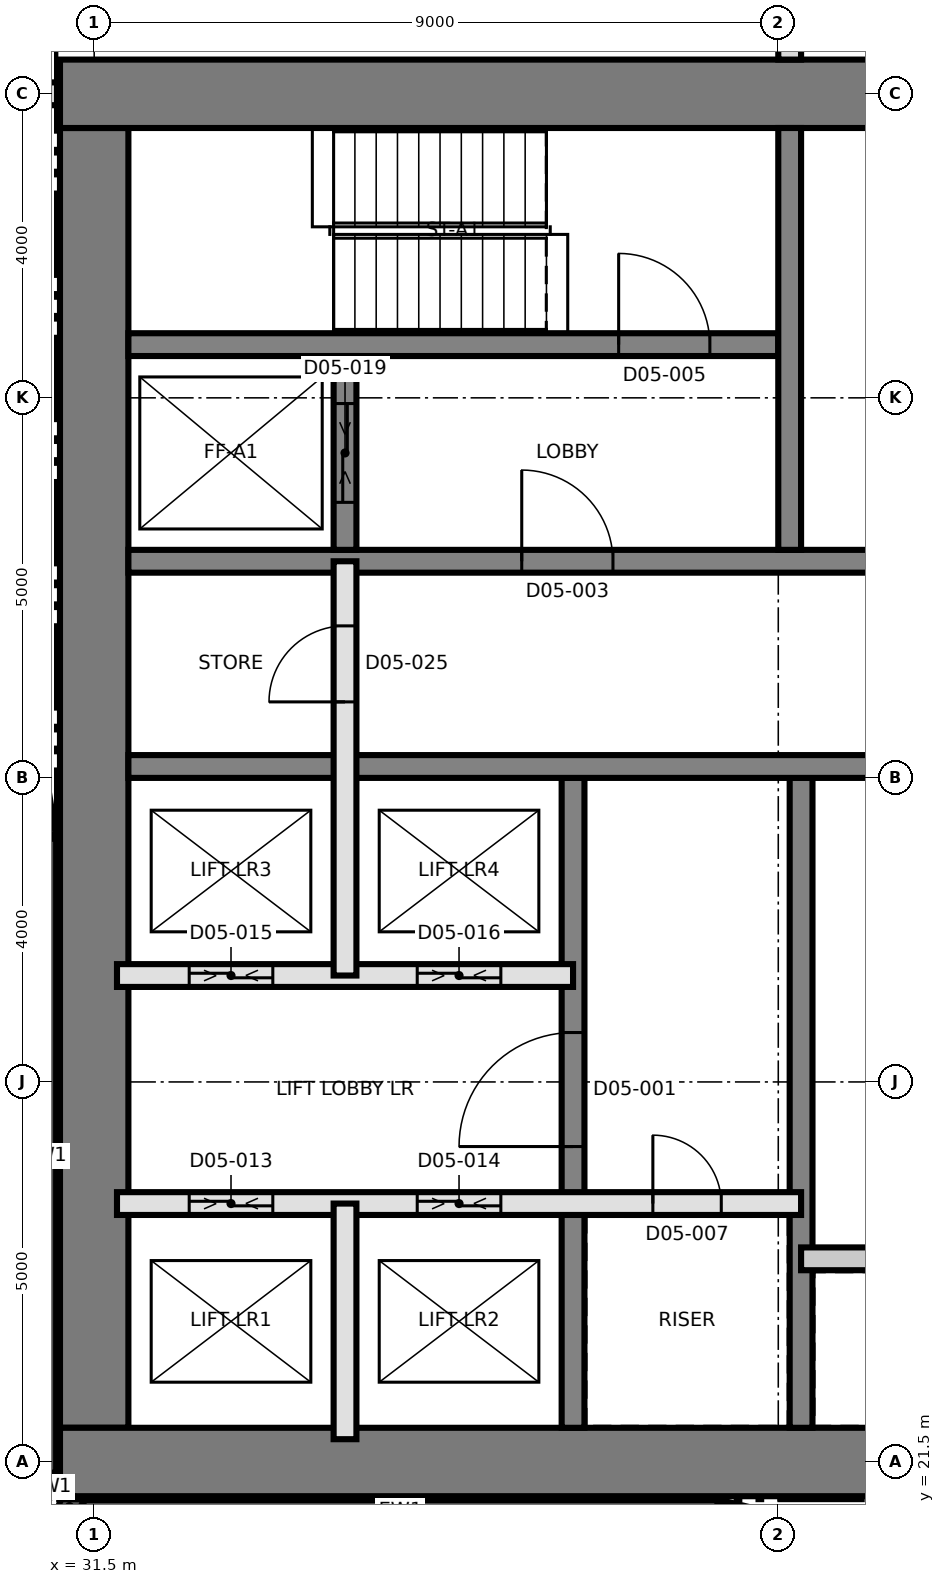
"""IFC4 building model, lengths in metres.
Left out: names, types, materials, properties, quantities, classifications, styles, units other than length and angle.
Written with IfcOpenShell. Run it as: python <this file> out.ifc"""

import sys

from ifc_helpers import new_model, si_unit, direction, frame, frame_2d, origin, place, context, subcontext, project, spatial, rectangle, extrude, element, fill, save


model = new_model("IFC4")
c1 = context("Model", 3, precision=1e-05, world=origin(), true_north=direction((0.0, 1.0)))
c2 = subcontext(c1, "Body", "Model", "MODEL_VIEW")
j1 = project(units=[si_unit("LENGTHUNIT", "METRE"), si_unit("PLANEANGLEUNIT", "RADIAN")], contexts=[c1])
p1 = place(None, origin())
s1 = spatial("IfcSite", under=j1, at=p1, CompositionType="ELEMENT")
p2 = place(p1, origin())
s2 = spatial("IfcBuilding", under=s1, at=p2, CompositionType="ELEMENT")
p3 = place(p2, frame((0.0, 0.0, 77.9)))
s3 = spatial("IfcBuildingStorey", under=s2, at=p3, CompositionType="ELEMENT", Elevation=77.9)
p4 = place(p3, frame((31.5, 21.95, 0.0), z_axis=(0.0, 0.0, 1.0), x_axis=(0.0, 1.0, 0.0)))
e1 = element("IfcWall", 1, at=p4, inside=s3, PredefinedType="SHEAR", context=c2, shape_type="SweptSolid", body=[
    extrude(rectangle(XDim=17.1, YDim=0.9, at=frame_2d((8.55, 0.0))), origin(), (0.0, 0.0, 1.0), 3.7),
])
p5 = place(p3, frame((31.05, 21.5, 0.0), z_axis=(0.0, 0.0, 1.0), x_axis=(1.0, 0.0, 0.0)))
e2 = element("IfcWall", 2, at=p5, inside=s3, PredefinedType="SHEAR", context=c2, shape_type="SweptSolid", body=[
    extrude(rectangle(XDim=27.0, YDim=0.9, at=frame_2d((13.5, 0.0))), origin(), (0.0, 0.0, 1.0), 3.7),
])
p6 = place(p3, frame((31.05, 39.5, 0.0), z_axis=(0.0, 0.0, 1.0), x_axis=(1.0, 0.0, 0.0)))
e3 = element("IfcWall", 3, at=p6, inside=s3, PredefinedType="SHEAR", context=c2, shape_type="SweptSolid", body=[
    extrude(rectangle(XDim=27.0, YDim=0.9, at=frame_2d((13.5, 0.0))), origin(), (0.0, 0.0, 1.0), 3.7),
])
p7 = place(p6, frame((10.65, 0.0, 0.0)))
e4 = element("IfcOpeningElement", 4, at=p7, cuts=e3, PredefinedType="OPENING", context=c2, shape_type="SweptSolid", body=[
    extrude(rectangle(XDim=1.2, YDim=2.1, at=frame_2d((0.6, 1.05))), frame((0.0, 0.46, 0.0), z_axis=(0.0, -1.0, 0.0), x_axis=(1.0, 0.0, 0.0)), (0.0, 0.0, 1.0), 0.92),
])
p8 = place(p3, frame((37.8, 21.95, 0.0), z_axis=(0.0, 0.0, 1.0), x_axis=(0.0, 1.0, 0.0)))
e5 = element("IfcWall", 5, at=p8, inside=s3, PredefinedType="SHEAR", context=c2, shape_type="SweptSolid", body=[
    extrude(rectangle(XDim=8.55, YDim=0.3, at=frame_2d((4.275, 0.0))), origin(), (0.0, 0.0, 1.0), 3.7),
])
p9 = place(p8, frame((3.7, 0.0, 0.0)))
e6 = element("IfcOpeningElement", 6, at=p9, cuts=e5, PredefinedType="OPENING", context=c2, shape_type="SweptSolid", body=[
    extrude(rectangle(XDim=1.5, YDim=2.1, at=frame_2d((0.75, 1.05))), frame((0.0, 0.16, 0.0), z_axis=(0.0, -1.0, 0.0), x_axis=(1.0, 0.0, 0.0)), (0.0, 0.0, 1.0), 0.32),
])
p10 = place(p3, frame((40.8, 21.95, 0.0), z_axis=(0.0, 0.0, 1.0), x_axis=(0.0, 1.0, 0.0)))
e7 = element("IfcWall", 7, at=p10, inside=s3, PredefinedType="SHEAR", context=c2, shape_type="SweptSolid", body=[
    extrude(rectangle(XDim=8.55, YDim=0.3, at=frame_2d((4.275, 0.0))), origin(), (0.0, 0.0, 1.0), 3.7),
])
p11 = place(p3, frame((31.95, 30.65, 0.0), z_axis=(0.0, 0.0, 1.0), x_axis=(1.0, 0.0, 0.0)))
e8 = element("IfcWall", 8, at=p11, inside=s3, PredefinedType="SHEAR", context=c2, shape_type="SweptSolid", body=[
    extrude(rectangle(XDim=26.1, YDim=0.3, at=frame_2d((13.05, 0.0))), origin(), (0.0, 0.0, 1.0), 3.7),
])
p12 = place(p11, frame((24.55, 0.0, 0.0)))
e9 = element("IfcOpeningElement", 9, at=p12, cuts=e8, PredefinedType="OPENING", context=c2, shape_type="SweptSolid", body=[
    extrude(rectangle(XDim=1.0, YDim=2.1, at=frame_2d((0.5, 1.05))), frame((0.0, 0.16, 0.0), z_axis=(0.0, -1.0, 0.0), x_axis=(1.0, 0.0, 0.0)), (0.0, 0.0, 1.0), 0.32),
])
p13 = place(p11, frame((11.35, 0.0, 0.0)))
e10 = element("IfcOpeningElement", 10, at=p13, cuts=e8, PredefinedType="OPENING", context=c2, shape_type="SweptSolid", body=[
    extrude(rectangle(XDim=1.0, YDim=2.1, at=frame_2d((0.5, 1.05))), frame((0.0, 0.16, 0.0), z_axis=(0.0, -1.0, 0.0), x_axis=(1.0, 0.0, 0.0)), (0.0, 0.0, 1.0), 0.32),
])
p14 = place(p3, frame((31.95, 33.35, 0.0), z_axis=(0.0, 0.0, 1.0), x_axis=(1.0, 0.0, 0.0)))
e11 = element("IfcWall", 11, at=p14, inside=s3, PredefinedType="SHEAR", context=c2, shape_type="SweptSolid", body=[
    extrude(rectangle(XDim=26.1, YDim=0.3, at=frame_2d((13.05, 0.0))), origin(), (0.0, 0.0, 1.0), 3.7),
])
p15 = place(p14, frame((13.7, 0.0, 0.0)))
e12 = element("IfcOpeningElement", 12, at=p15, cuts=e11, PredefinedType="OPENING", context=c2, shape_type="SweptSolid", body=[
    extrude(rectangle(XDim=1.4, YDim=2.1, at=frame_2d((0.7, 1.05))), frame((0.0, 0.16, 0.0), z_axis=(0.0, -1.0, 0.0), x_axis=(1.0, 0.0, 0.0)), (0.0, 0.0, 1.0), 0.32),
])
p16 = place(p14, frame((5.175, 0.0, 0.0)))
e13 = element("IfcOpeningElement", 13, at=p16, cuts=e11, PredefinedType="OPENING", context=c2, shape_type="SweptSolid", body=[
    extrude(rectangle(XDim=1.2, YDim=2.1, at=frame_2d((0.6, 1.05))), frame((0.0, 0.16, 0.0), z_axis=(0.0, -1.0, 0.0), x_axis=(1.0, 0.0, 0.0)), (0.0, 0.0, 1.0), 0.32),
])
p17 = place(p14, frame((19.725, 0.0, 0.0)))
e14 = element("IfcOpeningElement", 14, at=p17, cuts=e11, PredefinedType="OPENING", context=c2, shape_type="SweptSolid", body=[
    extrude(rectangle(XDim=1.2, YDim=2.1, at=frame_2d((0.6, 1.05))), frame((0.0, 0.16, 0.0), z_axis=(0.0, -1.0, 0.0), x_axis=(1.0, 0.0, 0.0)), (0.0, 0.0, 1.0), 0.32),
])
p18 = place(p3, frame((31.95, 36.2, 0.0), z_axis=(0.0, 0.0, 1.0), x_axis=(1.0, 0.0, 0.0)))
e15 = element("IfcWall", 15, at=p18, inside=s3, PredefinedType="SHEAR", context=c2, shape_type="SweptSolid", body=[
    extrude(rectangle(XDim=8.55, YDim=0.3, at=frame_2d((4.275, 0.0))), origin(), (0.0, 0.0, 1.0), 3.7),
])
p19 = place(p18, frame((6.45, 0.0, 0.0)))
e16 = element("IfcOpeningElement", 16, at=p19, cuts=e15, PredefinedType="OPENING", context=c2, shape_type="SweptSolid", body=[
    extrude(rectangle(XDim=1.2, YDim=2.1, at=frame_2d((0.6, 1.05))), frame((0.0, 0.16, 0.0), z_axis=(0.0, -1.0, 0.0), x_axis=(1.0, 0.0, 0.0)), (0.0, 0.0, 1.0), 0.32),
])
p20 = place(p3, frame((40.65, 33.5, 0.0), z_axis=(0.0, 0.0, 1.0), x_axis=(0.0, 1.0, 0.0)))
e17 = element("IfcWall", 17, at=p20, inside=s3, PredefinedType="SHEAR", context=c2, shape_type="SweptSolid", body=[
    extrude(rectangle(XDim=5.55, YDim=0.3, at=frame_2d((2.775, 0.0))), origin(), (0.0, 0.0, 1.0), 3.7),
])
p21 = place(p3, frame((34.8, 33.5, 0.0), z_axis=(0.0, 0.0, 1.0), x_axis=(0.0, 1.0, 0.0)))
e18 = element("IfcWall", 18, at=p21, inside=s3, PredefinedType="SHEAR", context=c2, shape_type="SweptSolid", body=[
    extrude(rectangle(XDim=2.55, YDim=0.3, at=frame_2d((1.275, 0.0))), origin(), (0.0, 0.0, 1.0), 3.7),
])
p22 = place(p21, frame((0.625, 0.0, 0.0)))
e19 = element("IfcOpeningElement", 19, at=p22, cuts=e18, PredefinedType="OPENING", context=c2, shape_type="SweptSolid", body=[
    extrude(rectangle(XDim=1.3, YDim=2.4, at=frame_2d((0.65, 1.2))), frame((0.0, 0.16, 0.0), z_axis=(0.0, -1.0, 0.0), x_axis=(1.0, 0.0, 0.0)), (0.0, 0.0, 1.0), 0.32),
])
p23 = place(p3, frame((30.85, 29.699, 0.0), z_axis=(0.0, 0.0, 1.0), x_axis=(0.0, -1.0, 0.0)))
e20 = element("IfcWall", 20, at=p23, inside=s3, PredefinedType="SOLIDWALL", context=c2, shape_type="SweptSolid", body=[
    extrude(rectangle(XDim=8.34, YDim=0.3, at=frame_2d((4.17, 0.0))), origin(), (0.0, 0.0, 1.0), 3.4),
])
for number, where, z_axis, x_axis in (
    (21, (30.861, 21.302, 0.0), (0.0, 0.0, 1.0), (0.383, -0.924, 0.0)),
    (22, (31.048, 20.967, 0.0), (0.0, 0.0, 1.0), (0.924, -0.383, 0.0)),
):
    element("IfcWall", number, at=place(p3, frame(where, z_axis=z_axis, x_axis=x_axis)), inside=s3, PredefinedType="SOLIDWALL", context=c2, shape_type="SweptSolid", body=[
        extrude(rectangle(XDim=0.275, YDim=0.3, at=frame_2d((0.138, 0.0))), origin(), (0.0, 0.0, 1.0), 3.4),
    ])
p24 = place(p3, frame((31.36, 20.85, 0.0), z_axis=(0.0, 0.0, 1.0), x_axis=(1.0, 0.0, 0.0)))
e23 = element("IfcWall", 23, at=p24, inside=s3, PredefinedType="SOLIDWALL", context=c2, shape_type="SweptSolid", body=[
    extrude(rectangle(XDim=8.34, YDim=0.3, at=frame_2d((4.17, 0.0))), origin(), (0.0, 0.0, 1.0), 3.4),
])
p25 = place(p3, frame((39.735, 20.846, 0.0), z_axis=(0.0, 0.0, 1.0), x_axis=(0.97206095595, -0.234728562212, 0.0)))
e24 = element("IfcWall", 24, at=p25, inside=s3, PredefinedType="SOLIDWALL", context=c2, shape_type="SweptSolid", body=[
    extrude(rectangle(XDim=2.35, YDim=0.3, at=frame_2d((1.175, 0.0))), origin(), (0.0, 0.0, 1.0), 3.4),
])
p26 = place(p3, frame((30.152, 34.0, 0.0), z_axis=(0.0, 0.0, 1.0), x_axis=(0.160697303067, -0.987003736967, 0.0)))
e25 = element("IfcWall", 25, at=p26, inside=s3, PredefinedType="SOLIDWALL", context=c2, shape_type="SweptSolid", body=[
    extrude(rectangle(XDim=4.333, YDim=0.3, at=frame_2d((2.167, 0.0))), origin(), (0.0, 0.0, 1.0), 3.4),
])
p27 = place(p26, frame((0.366, 0.0, 0.9)))
e26 = element("IfcOpeningElement", 26, at=p27, cuts=e25, PredefinedType="OPENING", context=c2, shape_type="SweptSolid", body=[
    extrude(rectangle(XDim=3.6, YDim=1.5, at=frame_2d((1.8, 0.75))), frame((0.0, 0.16, 0.0), z_axis=(0.0, -1.0, 0.0), x_axis=(1.0, 0.0, 0.0)), (0.0, 0.0, 1.0), 0.32),
])
p28 = place(p3, frame((40.8, 24.173, 0.0), z_axis=(0.0, 0.0, 1.0), x_axis=(1.0, 0.0, 0.0)))
e27 = element("IfcWall", 27, at=p28, inside=s3, PredefinedType="PARTITIONING", context=c2, shape_type="SweptSolid", body=[
    extrude(rectangle(XDim=6.0, YDim=0.3, at=frame_2d((3.0, 0.0))), origin(), (0.0, 0.0, 1.0), 3.4),
])
p29 = place(p28, frame((2.5, 0.0, 0.0)))
e28 = element("IfcOpeningElement", 28, at=p29, cuts=e27, PredefinedType="OPENING", context=c2, shape_type="SweptSolid", body=[
    extrude(rectangle(XDim=1.0, YDim=2.1, at=frame_2d((0.5, 1.05))), frame((0.0, 0.16, 0.0), z_axis=(0.0, -1.0, 0.0), x_axis=(1.0, 0.0, 0.0)), (0.0, 0.0, 1.0), 0.32),
])
p30 = place(p3, frame((31.8, 24.9, 0.0), z_axis=(0.0, 0.0, 1.0), x_axis=(1.0, 0.0, 0.0)))
e29 = element("IfcWall", 29, at=p30, inside=s3, PredefinedType="SOLIDWALL", context=c2, shape_type="SweptSolid", body=[
    extrude(rectangle(XDim=9.0, YDim=0.3, at=frame_2d((4.5, 0.0))), origin(), (0.0, 0.0, 1.0), 3.4),
])
p31 = place(p30, frame((7.05, 0.0, 0.0)))
e30 = element("IfcOpeningElement", 30, at=p31, cuts=e29, PredefinedType="OPENING", context=c2, shape_type="SweptSolid", body=[
    extrude(rectangle(XDim=0.9, YDim=2.1, at=frame_2d((0.45, 1.05))), frame((0.0, 0.16, 0.0), z_axis=(0.0, -1.0, 0.0), x_axis=(1.0, 0.0, 0.0)), (0.0, 0.0, 1.0), 0.32),
])
p32 = place(p30, frame((0.95, 0.0, 0.0)))
e31 = element("IfcOpeningElement", 31, at=p32, cuts=e29, PredefinedType="OPENING", context=c2, shape_type="SweptSolid", body=[
    extrude(rectangle(XDim=1.1, YDim=2.4, at=frame_2d((0.55, 1.2))), frame((0.0, 0.16, 0.0), z_axis=(0.0, -1.0, 0.0), x_axis=(1.0, 0.0, 0.0)), (0.0, 0.0, 1.0), 0.32),
])
p33 = place(p30, frame((3.95, 0.0, 0.0)))
e32 = element("IfcOpeningElement", 32, at=p33, cuts=e29, PredefinedType="OPENING", context=c2, shape_type="SweptSolid", body=[
    extrude(rectangle(XDim=1.1, YDim=2.4, at=frame_2d((0.55, 1.2))), frame((0.0, 0.16, 0.0), z_axis=(0.0, -1.0, 0.0), x_axis=(1.0, 0.0, 0.0)), (0.0, 0.0, 1.0), 0.32),
])
p34 = place(p3, frame((31.8, 27.9, 0.0), z_axis=(0.0, 0.0, 1.0), x_axis=(1.0, 0.0, 0.0)))
e33 = element("IfcWall", 33, at=p34, inside=s3, PredefinedType="SOLIDWALL", context=c2, shape_type="SweptSolid", body=[
    extrude(rectangle(XDim=6.0, YDim=0.3, at=frame_2d((3.0, 0.0))), origin(), (0.0, 0.0, 1.0), 3.4),
])
p35 = place(p34, frame((0.95, 0.0, 0.0)))
e34 = element("IfcOpeningElement", 34, at=p35, cuts=e33, PredefinedType="OPENING", context=c2, shape_type="SweptSolid", body=[
    extrude(rectangle(XDim=1.1, YDim=2.4, at=frame_2d((0.55, 1.2))), frame((0.0, 0.16, 0.0), z_axis=(0.0, -1.0, 0.0), x_axis=(1.0, 0.0, 0.0)), (0.0, 0.0, 1.0), 0.32),
])
p36 = place(p34, frame((3.95, 0.0, 0.0)))
e35 = element("IfcOpeningElement", 35, at=p36, cuts=e33, PredefinedType="OPENING", context=c2, shape_type="SweptSolid", body=[
    extrude(rectangle(XDim=1.1, YDim=2.4, at=frame_2d((0.55, 1.2))), frame((0.0, 0.16, 0.0), z_axis=(0.0, -1.0, 0.0), x_axis=(1.0, 0.0, 0.0)), (0.0, 0.0, 1.0), 0.32),
])
p37 = place(p3, frame((34.8, 21.8, 0.0), z_axis=(0.0, 0.0, 1.0), x_axis=(0.0, 1.0, 0.0)))
e36 = element("IfcWall", 36, at=p37, inside=s3, PredefinedType="SOLIDWALL", context=c2, shape_type="SweptSolid", body=[
    extrude(rectangle(XDim=3.1, YDim=0.3, at=frame_2d((1.55, 0.0))), origin(), (0.0, 0.0, 1.0), 3.4),
])
p38 = place(p3, frame((34.8, 27.9, 0.0), z_axis=(0.0, 0.0, 1.0), x_axis=(0.0, 1.0, 0.0)))
e37 = element("IfcWall", 37, at=p38, inside=s3, PredefinedType="SOLIDWALL", context=c2, shape_type="SweptSolid", body=[
    extrude(rectangle(XDim=5.45, YDim=0.3, at=frame_2d((2.725, 0.0))), origin(), (0.0, 0.0, 1.0), 3.4),
])
p39 = place(p38, frame((3.6, 0.0, 0.0)))
e38 = element("IfcOpeningElement", 38, at=p39, cuts=e37, PredefinedType="OPENING", context=c2, shape_type="SweptSolid", body=[
    extrude(rectangle(XDim=1.0, YDim=2.1, at=frame_2d((0.5, 1.05))), frame((0.0, 0.16, 0.0), z_axis=(0.0, -1.0, 0.0), x_axis=(1.0, 0.0, 0.0)), (0.0, 0.0, 1.0), 0.32),
])
p40 = place(p3, frame((30.35, 39.5, 0.0), z_axis=(0.0, 0.0, 1.0), x_axis=(1.0, 0.0, 0.0)))
e39 = element("IfcWall", 39, at=p40, inside=s3, PredefinedType="PARTITIONING", context=c2, shape_type="SweptSolid", body=[
    extrude(rectangle(XDim=0.68, YDim=0.3, at=frame_2d((0.34, 0.0))), origin(), (0.0, 0.0, 1.0), 3.4),
])
p41 = place(p3, frame((40.65, 39.95, 0.0), z_axis=(0.0, 0.0, 1.0), x_axis=(0.0, 1.0, 0.0)))
e40 = element("IfcWall", 40, at=p41, inside=s3, PredefinedType="PARTITIONING", context=c2, shape_type="SweptSolid", body=[
    extrude(rectangle(XDim=36.94, YDim=0.3, at=frame_2d((18.47, 0.0))), origin(), (0.0, 0.0, 1.0), 3.4),
])
p42 = place(p41, frame((0.7, 0.0, 0.0)))
e41 = element("IfcOpeningElement", 41, at=p42, cuts=e40, PredefinedType="OPENING", context=c2, shape_type="SweptSolid", body=[
    extrude(rectangle(XDim=1.0, YDim=2.1, at=frame_2d((0.5, 1.05))), frame((0.0, 0.16, 0.0), z_axis=(0.0, -1.0, 0.0), x_axis=(1.0, 0.0, 0.0)), (0.0, 0.0, 1.0), 0.32),
])
p43 = place(p41, frame((6.55, 0.0, 0.0)))
e42 = element("IfcOpeningElement", 42, at=p43, cuts=e40, PredefinedType="OPENING", context=c2, shape_type="SweptSolid", body=[
    extrude(rectangle(XDim=1.0, YDim=2.1, at=frame_2d((0.5, 1.05))), frame((0.0, 0.16, 0.0), z_axis=(0.0, -1.0, 0.0), x_axis=(1.0, 0.0, 0.0)), (0.0, 0.0, 1.0), 0.32),
])
p44 = place(p41, frame((9.22, 0.0, 0.0)))
e43 = element("IfcOpeningElement", 43, at=p44, cuts=e40, PredefinedType="OPENING", context=c2, shape_type="SweptSolid", body=[
    extrude(rectangle(XDim=1.0, YDim=2.1, at=frame_2d((0.5, 1.05))), frame((0.0, 0.16, 0.0), z_axis=(0.0, -1.0, 0.0), x_axis=(1.0, 0.0, 0.0)), (0.0, 0.0, 1.0), 0.32),
])
p45 = place(p41, frame((15.07, 0.0, 0.0)))
e44 = element("IfcOpeningElement", 44, at=p45, cuts=e40, PredefinedType="OPENING", context=c2, shape_type="SweptSolid", body=[
    extrude(rectangle(XDim=1.0, YDim=2.1, at=frame_2d((0.5, 1.05))), frame((0.0, 0.16, 0.0), z_axis=(0.0, -1.0, 0.0), x_axis=(1.0, 0.0, 0.0)), (0.0, 0.0, 1.0), 0.32),
])
p46 = place(p41, frame((21.05, 0.0, 0.0)))
e45 = element("IfcOpeningElement", 45, at=p46, cuts=e40, PredefinedType="OPENING", context=c2, shape_type="SweptSolid", body=[
    extrude(rectangle(XDim=1.0, YDim=2.4, at=frame_2d((0.5, 1.2))), frame((0.0, 0.16, 0.0), z_axis=(0.0, -1.0, 0.0), x_axis=(1.0, 0.0, 0.0)), (0.0, 0.0, 1.0), 0.32),
])
p47 = place(p9, origin())
e46 = element("IfcDoor", 46, at=p47, inside=s3, OperationType="SINGLE_SWING_LEFT", PredefinedType="DOOR", context=c2, shape_type="SweptSolid", body=[
    extrude(rectangle(XDim=1.5, YDim=2.1, at=frame_2d((0.75, 1.05))), frame((0.0, 0.025, 0.0), z_axis=(0.0, -1.0, 0.0), x_axis=(1.0, 0.0, 0.0)), (0.0, 0.0, 1.0), 0.05),
])
fill(e6, e46)
p48 = place(p16, origin())
e47 = element("IfcDoor", 47, at=p48, inside=s3, OperationType="SINGLE_SWING_LEFT", PredefinedType="DOOR", context=c2, shape_type="SweptSolid", body=[
    extrude(rectangle(XDim=1.2, YDim=2.1, at=frame_2d((0.6, 1.05))), frame((0.0, 0.025, 0.0), z_axis=(0.0, -1.0, 0.0), x_axis=(1.0, 0.0, 0.0)), (0.0, 0.0, 1.0), 0.05),
])
fill(e13, e47)
p49 = place(p19, origin())
e48 = element("IfcDoor", 48, at=p49, inside=s3, OperationType="SINGLE_SWING_RIGHT", PredefinedType="DOOR", context=c2, shape_type="SweptSolid", body=[
    extrude(rectangle(XDim=1.2, YDim=2.1, at=frame_2d((0.6, 1.05))), frame((0.0, 0.025, 0.0), z_axis=(0.0, -1.0, 0.0), x_axis=(1.0, 0.0, 0.0)), (0.0, 0.0, 1.0), 0.05),
])
fill(e16, e48)
p50 = place(p31, origin())
e49 = element("IfcDoor", 49, at=p50, inside=s3, OperationType="SINGLE_SWING_LEFT", PredefinedType="DOOR", context=c2, shape_type="SweptSolid", body=[
    extrude(rectangle(XDim=0.9, YDim=2.1, at=frame_2d((0.45, 1.05))), frame((0.0, 0.025, 0.0), z_axis=(0.0, -1.0, 0.0), x_axis=(1.0, 0.0, 0.0)), (0.0, 0.0, 1.0), 0.05),
])
fill(e30, e49)
p51 = place(p32, origin())
e50 = element("IfcDoor", 50, at=p51, inside=s3, OperationType="SLIDING_TO_LEFT", PredefinedType="DOOR", context=c2, shape_type="SweptSolid", body=[
    extrude(rectangle(XDim=1.1, YDim=2.4, at=frame_2d((0.55, 1.2))), frame((0.0, 0.025, 0.0), z_axis=(0.0, -1.0, 0.0), x_axis=(1.0, 0.0, 0.0)), (0.0, 0.0, 1.0), 0.05),
])
fill(e31, e50)
p52 = place(p33, origin())
e51 = element("IfcDoor", 51, at=p52, inside=s3, OperationType="SLIDING_TO_LEFT", PredefinedType="DOOR", context=c2, shape_type="SweptSolid", body=[
    extrude(rectangle(XDim=1.1, YDim=2.4, at=frame_2d((0.55, 1.2))), frame((0.0, 0.025, 0.0), z_axis=(0.0, -1.0, 0.0), x_axis=(1.0, 0.0, 0.0)), (0.0, 0.0, 1.0), 0.05),
])
fill(e32, e51)
p53 = place(p35, origin())
e52 = element("IfcDoor", 52, at=p53, inside=s3, OperationType="SLIDING_TO_LEFT", PredefinedType="DOOR", context=c2, shape_type="SweptSolid", body=[
    extrude(rectangle(XDim=1.1, YDim=2.4, at=frame_2d((0.55, 1.2))), frame((0.0, 0.025, 0.0), z_axis=(0.0, -1.0, 0.0), x_axis=(1.0, 0.0, 0.0)), (0.0, 0.0, 1.0), 0.05),
])
fill(e34, e52)
p54 = place(p36, origin())
e53 = element("IfcDoor", 53, at=p54, inside=s3, OperationType="SLIDING_TO_LEFT", PredefinedType="DOOR", context=c2, shape_type="SweptSolid", body=[
    extrude(rectangle(XDim=1.1, YDim=2.4, at=frame_2d((0.55, 1.2))), frame((0.0, 0.025, 0.0), z_axis=(0.0, -1.0, 0.0), x_axis=(1.0, 0.0, 0.0)), (0.0, 0.0, 1.0), 0.05),
])
fill(e35, e53)
p55 = place(p22, origin())
e54 = element("IfcDoor", 54, at=p55, inside=s3, OperationType="SLIDING_TO_LEFT", PredefinedType="DOOR", context=c2, shape_type="SweptSolid", body=[
    extrude(rectangle(XDim=1.3, YDim=2.4, at=frame_2d((0.65, 1.2))), frame((0.0, 0.025, 0.0), z_axis=(0.0, -1.0, 0.0), x_axis=(1.0, 0.0, 0.0)), (0.0, 0.0, 1.0), 0.05),
])
fill(e19, e54)
p56 = place(p39, origin())
e55 = element("IfcDoor", 55, at=p56, inside=s3, OperationType="SINGLE_SWING_LEFT", PredefinedType="DOOR", context=c2, shape_type="SweptSolid", body=[
    extrude(rectangle(XDim=1.0, YDim=2.1, at=frame_2d((0.5, 1.05))), frame((0.0, 0.025, 0.0), z_axis=(0.0, -1.0, 0.0), x_axis=(1.0, 0.0, 0.0)), (0.0, 0.0, 1.0), 0.05),
])
fill(e38, e55)
save(model, sys.argv[1])
